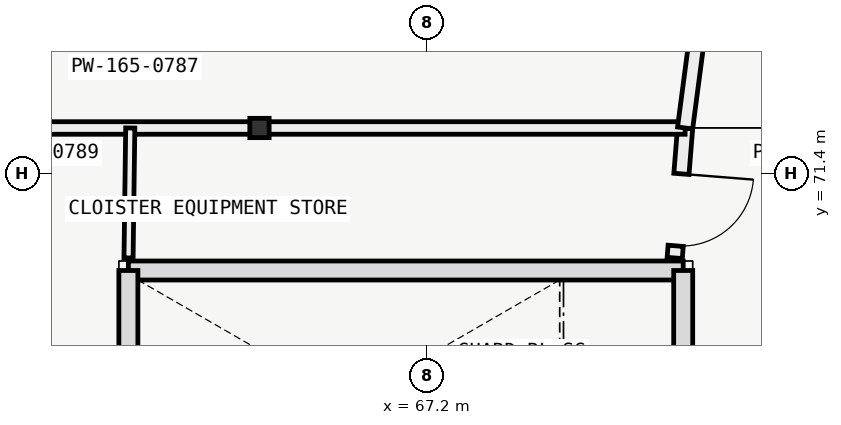
"""IFC4 building model, lengths in metres.
Left out: names, types, materials, properties, quantities, classifications, styles, units other than length and angle.
Written with IfcOpenShell. Run it as: python <this file> out.ifc"""

import sys

from ifc_helpers import new_model, si_unit, direction, frame, frame_2d, origin, origin_2d, place, context, subcontext, project, spatial, rectangle, i_section, extrude, element, fill, save


model = new_model("IFC4")
c1 = context("Model", 3, precision=1e-05, world=origin(), true_north=direction((0.0, 1.0)))
c2 = subcontext(c1, "Body", "Model", "MODEL_VIEW")
j1 = project(units=[si_unit("LENGTHUNIT", "METRE"), si_unit("PLANEANGLEUNIT", "RADIAN")], contexts=[c1])
p1 = place(None, origin())
s1 = spatial("IfcSite", under=j1, at=p1, CompositionType="ELEMENT")
p2 = place(p1, origin())
s2 = spatial("IfcBuilding", under=s1, at=p2, CompositionType="ELEMENT")
p3 = place(p2, frame((0.0, 0.0, 13.8)))
s3 = spatial("IfcBuildingStorey", under=s2, at=p3, CompositionType="ELEMENT", Elevation=13.8)
p4 = place(p3, frame((65.0, 72.0, 0.0), z_axis=(0.0, 0.0, 1.0), x_axis=(1.0, 0.0, 0.0)))
e1 = element("IfcColumn", 1, at=p4, inside=s3, PredefinedType="COLUMN", context=c2, shape_type="SweptSolid", body=[
    extrude(i_section(OverallWidth=0.254, OverallDepth=0.254, WebThickness=0.009, FlangeThickness=0.014, FilletRadius=0.014, at=origin_2d()), origin(), (0.0, 0.0, 1.0), 4.2),
])
p5 = place(p3, frame((70.575, 70.125, 0.0), z_axis=(0.0, 0.0, 1.0), x_axis=(-1.0, 0.0, 0.0)))
e2 = element("IfcWall", 2, at=p5, inside=s3, PredefinedType="SOLIDWALL", context=c2, shape_type="SweptSolid", body=[
    extrude(rectangle(XDim=7.3, YDim=0.25, at=frame_2d((3.65, 0.0))), origin(), (0.0, 0.0, 1.0), 3.15),
])
p6 = place(p3, frame((63.275, 70.125, 0.0), z_axis=(0.0, 0.0, 1.0), x_axis=(0.0, -1.0, 0.0)))
e3 = element("IfcWall", 3, at=p6, inside=s3, PredefinedType="SOLIDWALL", context=c2, shape_type="SweptSolid", body=[
    extrude(rectangle(XDim=3.45, YDim=0.25, at=frame_2d((1.725, 0.0))), origin(), (0.0, 0.0, 1.0), 3.15),
])
p7 = place(p3, frame((70.575, 66.675, 0.0), z_axis=(0.0, 0.0, 1.0), x_axis=(0.0, 1.0, 0.0)))
e4 = element("IfcWall", 4, at=p7, inside=s3, PredefinedType="SOLIDWALL", context=c2, shape_type="SweptSolid", body=[
    extrude(rectangle(XDim=3.45, YDim=0.25, at=frame_2d((1.725, 0.0))), origin(), (0.0, 0.0, 1.0), 3.15),
])
p8 = place(p7, frame((1.175, 0.0, 0.0)))
e5 = element("IfcOpeningElement", 5, at=p8, cuts=e4, PredefinedType="OPENING", context=c2, shape_type="SweptSolid", body=[
    extrude(rectangle(XDim=1.1, YDim=2.2, at=frame_2d((0.55, 1.1))), frame((0.0, 0.135, 0.0), z_axis=(0.0, -1.0, 0.0), x_axis=(1.0, 0.0, 0.0)), (0.0, 0.0, 1.0), 0.27),
])
p9 = place(p3, frame((70.6, 72.0, 0.0), z_axis=(0.0, 0.0, 1.0), x_axis=(-0.07984138391, -0.996807580938, 0.0)))
e6 = element("IfcWall", 6, at=p9, inside=s3, PredefinedType="PARTITIONING", context=c2, shape_type="SweptSolid", body=[
    extrude(rectangle(XDim=1.715, YDim=0.2, at=frame_2d((0.858, 0.0))), origin(), (0.0, 0.0, 1.0), 3.85),
])
p10 = place(p9, frame((0.605, 0.0, 0.0)))
e7 = element("IfcOpeningElement", 7, at=p10, cuts=e6, PredefinedType="OPENING", context=c2, shape_type="SweptSolid", body=[
    extrude(rectangle(XDim=0.95, YDim=2.1, at=frame_2d((0.475, 1.05))), frame((0.0, 0.11, 0.0), z_axis=(0.0, -1.0, 0.0), x_axis=(1.0, 0.0, 0.0)), (0.0, 0.0, 1.0), 0.22),
])
p11 = place(p3, frame((70.6, 72.0, 0.0), z_axis=(0.0, 0.0, 1.0), x_axis=(-1.0, 0.0, 0.0)))
e8 = element("IfcWall", 8, at=p11, inside=s3, PredefinedType="PARTITIONING", context=c2, shape_type="SweptSolid", body=[
    extrude(rectangle(XDim=14.48, YDim=0.165, at=frame_2d((7.24, 0.0))), origin(), (0.0, 0.0, 1.0), 3.828),
])
p12 = place(p3, frame((63.277, 70.29, 0.0), z_axis=(0.0, 0.0, 1.0), x_axis=(0.013419693814, 0.999909951855, 0.0)))
e9 = element("IfcWall", 9, at=p12, inside=s3, PredefinedType="PARTITIONING", context=c2, shape_type="SweptSolid", body=[
    extrude(rectangle(XDim=1.71, YDim=0.12, at=frame_2d((0.855, 0.0))), origin(), (0.0, 0.0, 1.0), 3.85),
])
p13 = place(p3, frame((71.67, 80.127, 0.0), z_axis=(0.0, 0.0, 1.0), x_axis=(-0.130513066404, -0.991446589332, 0.0)))
e10 = element("IfcWall", 10, at=p13, inside=s3, PredefinedType="PARTITIONING", context=c2, shape_type="SweptSolid", body=[
    extrude(rectangle(XDim=8.197, YDim=0.2, at=frame_2d((4.099, 0.0))), origin(), (0.0, 0.0, 1.0), 3.777),
])
p14 = place(p13, frame((4.1, 0.0, 0.0)))
e11 = element("IfcOpeningElement", 11, at=p14, cuts=e10, PredefinedType="OPENING", context=c2, shape_type="SweptSolid", body=[
    extrude(rectangle(XDim=0.95, YDim=2.1, at=frame_2d((0.475, 1.05))), frame((0.0, 0.11, 0.0), z_axis=(0.0, -1.0, 0.0), x_axis=(1.0, 0.0, 0.0)), (0.0, 0.0, 1.0), 0.22),
])
p15 = place(p10, origin())
e12 = element("IfcDoor", 12, at=p15, inside=s3, OperationType="SINGLE_SWING_LEFT", PredefinedType="DOOR", context=c2, shape_type="SweptSolid", body=[
    extrude(rectangle(XDim=0.95, YDim=2.1, at=frame_2d((0.475, 1.05))), frame((0.0, 0.025, 0.0), z_axis=(0.0, -1.0, 0.0), x_axis=(1.0, 0.0, 0.0)), (0.0, 0.0, 1.0), 0.05),
])
fill(e7, e12)
save(model, sys.argv[1])
